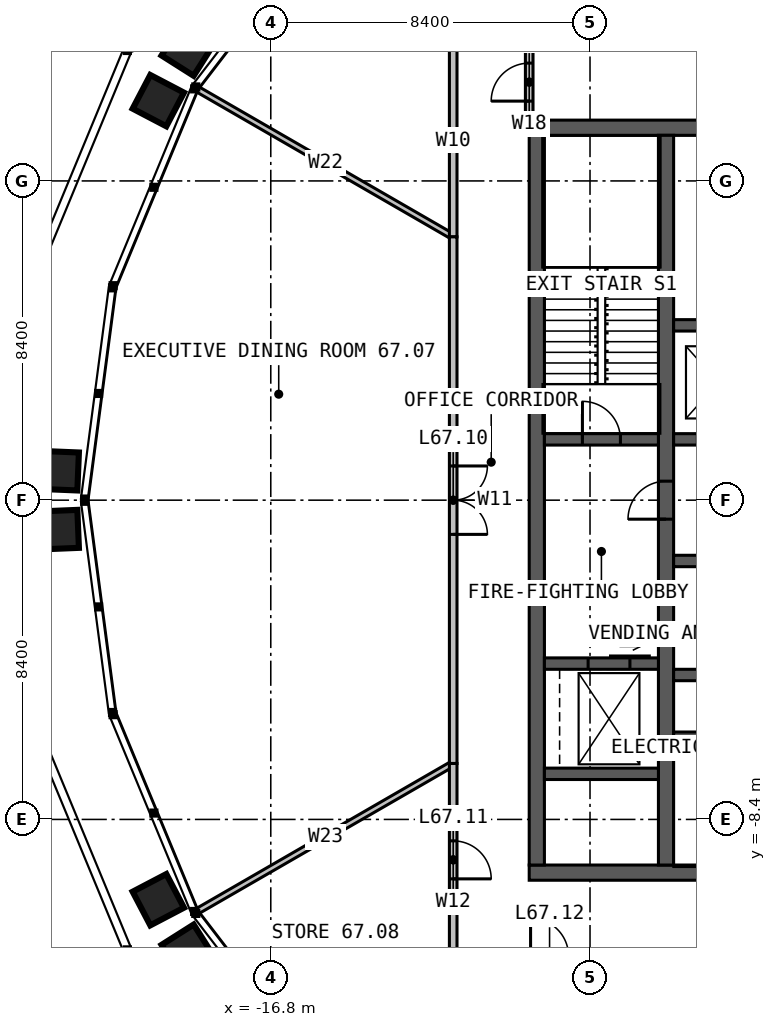
"""IFC4 building model, lengths in metres.
Left out: names, types, materials, properties, quantities, classifications, styles, units other than length and angle.
Written with IfcOpenShell. Run it as: python <this file> out.ifc"""

import sys

from ifc_helpers import new_model, si_unit, direction, frame, frame_2d, origin, place, context, subcontext, project, spatial, rectangle, extrude, element, fill, save


model = new_model("IFC4")
c1 = context("Model", 3, precision=1e-05, world=origin(), true_north=direction((0.0, 1.0)))
c2 = subcontext(c1, "Body", "Model", "MODEL_VIEW")
j1 = project(units=[si_unit("LENGTHUNIT", "METRE"), si_unit("PLANEANGLEUNIT", "RADIAN")], contexts=[c1])
p1 = place(None, origin())
s1 = spatial("IfcSite", under=j1, at=p1, CompositionType="ELEMENT")
p2 = place(p1, origin())
s2 = spatial("IfcBuilding", under=s1, at=p2, CompositionType="ELEMENT")
p3 = place(p2, frame((0.0, 0.0, 276.0)))
s3 = spatial("IfcBuildingStorey", under=s2, at=p3, CompositionType="ELEMENT", Elevation=276.0)
p4 = place(p3, frame((-10.0, 9.8, 0.0), z_axis=(0.0, 0.0, 1.0), x_axis=(1.0, 0.0, 0.0)))
e1 = element("IfcWall", 1, at=p4, inside=s3, PredefinedType="SOLIDWALL", context=c2, shape_type="SweptSolid", body=[
    extrude(rectangle(XDim=20.0, YDim=0.4, at=frame_2d((10.0, 0.0))), origin(), (0.0, 0.0, 1.0), 4.0),
])
p5 = place(p4, frame((9.4, 0.0, 0.0)))
e2 = element("IfcOpeningElement", 2, at=p5, cuts=e1, PredefinedType="OPENING", context=c2, shape_type="SweptSolid", body=[
    extrude(rectangle(XDim=1.2, YDim=2.2, at=frame_2d((0.6, 1.1))), frame((0.0, 0.21, 0.0), z_axis=(0.0, -1.0, 0.0), x_axis=(1.0, 0.0, 0.0)), (0.0, 0.0, 1.0), 0.42),
])
p6 = place(p3, frame((10.0, -9.8, 0.0), z_axis=(0.0, 0.0, 1.0), x_axis=(-1.0, 0.0, 0.0)))
e3 = element("IfcWall", 3, at=p6, inside=s3, PredefinedType="SOLIDWALL", context=c2, shape_type="SweptSolid", body=[
    extrude(rectangle(XDim=20.0, YDim=0.4, at=frame_2d((10.0, 0.0))), origin(), (0.0, 0.0, 1.0), 4.0),
])
p7 = place(p6, frame((6.875, 0.0, 0.0)))
e4 = element("IfcOpeningElement", 4, at=p7, cuts=e3, PredefinedType="OPENING", context=c2, shape_type="SweptSolid", body=[
    extrude(rectangle(XDim=1.2, YDim=2.2, at=frame_2d((0.6, 1.1))), frame((0.0, 0.21, 0.0), z_axis=(0.0, -1.0, 0.0), x_axis=(1.0, 0.0, 0.0)), (0.0, 0.0, 1.0), 0.42),
])
p8 = place(p3, frame((-9.8, 9.6, 0.0), z_axis=(0.0, 0.0, 1.0), x_axis=(0.0, -1.0, 0.0)))
e5 = element("IfcWall", 5, at=p8, inside=s3, PredefinedType="SOLIDWALL", context=c2, shape_type="SweptSolid", body=[
    extrude(rectangle(XDim=19.2, YDim=0.4, at=frame_2d((9.6, 0.0))), origin(), (0.0, 0.0, 1.0), 4.0),
])
p9 = place(p3, frame((-6.4, -9.6, 0.0), z_axis=(0.0, 0.0, 1.0), x_axis=(0.0, 1.0, 0.0)))
e6 = element("IfcWall", 6, at=p9, inside=s3, PredefinedType="SOLIDWALL", context=c2, shape_type="SweptSolid", body=[
    extrude(rectangle(XDim=19.2, YDim=0.4, at=frame_2d((9.6, 0.0))), origin(), (0.0, 0.0, 1.0), 4.0),
])
p10 = place(p9, frame((9.1, 0.0, 0.0)))
e7 = element("IfcOpeningElement", 7, at=p10, cuts=e6, PredefinedType="OPENING", context=c2, shape_type="SweptSolid", body=[
    extrude(rectangle(XDim=1.0, YDim=2.2, at=frame_2d((0.5, 1.1))), frame((0.0, 0.21, 0.0), z_axis=(0.0, -1.0, 0.0), x_axis=(1.0, 0.0, 0.0)), (0.0, 0.0, 1.0), 0.42),
])
p11 = place(p3, frame((-6.2, 1.6, 0.0), z_axis=(0.0, 0.0, 1.0), x_axis=(1.0, 0.0, 0.0)))
e8 = element("IfcWall", 8, at=p11, inside=s3, PredefinedType="SOLIDWALL", context=c2, shape_type="SweptSolid", body=[
    extrude(rectangle(XDim=4.85, YDim=0.3, at=frame_2d((2.425, 0.0))), origin(), (0.0, 0.0, 1.0), 4.0),
])
p12 = place(p11, frame((0.625, 0.0, 0.0)))
e9 = element("IfcOpeningElement", 9, at=p12, cuts=e8, PredefinedType="OPENING", context=c2, shape_type="SweptSolid", body=[
    extrude(rectangle(XDim=1.1, YDim=2.2, at=frame_2d((0.55, 1.1))), frame((0.0, 0.16, 0.0), z_axis=(0.0, -1.0, 0.0), x_axis=(1.0, 0.0, 0.0)), (0.0, 0.0, 1.0), 0.32),
])
p13 = place(p11, frame((3.15, 0.0, 0.0)))
e10 = element("IfcOpeningElement", 10, at=p13, cuts=e8, PredefinedType="OPENING", context=c2, shape_type="SweptSolid", body=[
    extrude(rectangle(XDim=1.1, YDim=2.2, at=frame_2d((0.55, 1.1))), frame((0.0, 0.16, 0.0), z_axis=(0.0, -1.0, 0.0), x_axis=(1.0, 0.0, 0.0)), (0.0, 0.0, 1.0), 0.32),
])
p14 = place(p3, frame((-6.2, 4.6, 0.0), z_axis=(0.0, 0.0, 1.0), x_axis=(1.0, 0.0, 0.0)))
e11 = element("IfcWall", 11, at=p14, inside=s3, PredefinedType="SOLIDWALL", context=c2, shape_type="SweptSolid", body=[
    extrude(rectangle(XDim=4.85, YDim=0.3, at=frame_2d((2.425, 0.0))), origin(), (0.0, 0.0, 1.0), 4.0),
])
p15 = place(p3, frame((-6.2, -1.6, 0.0), z_axis=(0.0, 0.0, 1.0), x_axis=(1.0, 0.0, 0.0)))
e12 = element("IfcWall", 12, at=p15, inside=s3, PredefinedType="SOLIDWALL", context=c2, shape_type="SweptSolid", body=[
    extrude(rectangle(XDim=7.4, YDim=0.3, at=frame_2d((3.7, 0.0))), origin(), (0.0, 0.0, 1.0), 4.0),
])
p16 = place(p15, frame((0.675, 0.0, 0.0)))
e13 = element("IfcOpeningElement", 13, at=p16, cuts=e12, PredefinedType="OPENING", context=c2, shape_type="SweptSolid", body=[
    extrude(rectangle(XDim=1.0, YDim=2.2, at=frame_2d((0.5, 1.1))), frame((0.0, 0.16, 0.0), z_axis=(0.0, -1.0, 0.0), x_axis=(1.0, 0.0, 0.0)), (0.0, 0.0, 1.0), 0.32),
])
p17 = place(p15, frame((2.225, 0.0, 0.0)))
e14 = element("IfcOpeningElement", 14, at=p17, cuts=e12, PredefinedType="OPENING", context=c2, shape_type="SweptSolid", body=[
    extrude(rectangle(XDim=1.0, YDim=2.2, at=frame_2d((0.5, 1.1))), frame((0.0, 0.16, 0.0), z_axis=(0.0, -1.0, 0.0), x_axis=(1.0, 0.0, 0.0)), (0.0, 0.0, 1.0), 0.32),
])
p18 = place(p15, frame((3.695, 0.0, 0.0)))
e15 = element("IfcOpeningElement", 15, at=p18, cuts=e12, PredefinedType="OPENING", context=c2, shape_type="SweptSolid", body=[
    extrude(rectangle(XDim=1.0, YDim=2.2, at=frame_2d((0.5, 1.1))), frame((0.0, 0.16, 0.0), z_axis=(0.0, -1.0, 0.0), x_axis=(1.0, 0.0, 0.0)), (0.0, 0.0, 1.0), 0.32),
])
p19 = place(p3, frame((-6.2, -4.6, 0.0), z_axis=(0.0, 0.0, 1.0), x_axis=(1.0, 0.0, 0.0)))
e16 = element("IfcWall", 16, at=p19, inside=s3, PredefinedType="SOLIDWALL", context=c2, shape_type="SweptSolid", body=[
    extrude(rectangle(XDim=7.4, YDim=0.3, at=frame_2d((3.7, 0.0))), origin(), (0.0, 0.0, 1.0), 4.0),
])
p20 = place(p3, frame((-6.2, -6.2, 0.0), z_axis=(0.0, 0.0, 1.0), x_axis=(1.0, 0.0, 0.0)))
e17 = element("IfcWall", 17, at=p20, inside=s3, PredefinedType="SOLIDWALL", context=c2, shape_type="SweptSolid", body=[
    extrude(rectangle(XDim=7.4, YDim=0.2, at=frame_2d((3.7, 0.0))), origin(), (0.0, 0.0, 1.0), 4.0),
])
p21 = place(p3, frame((-9.6, 1.6, 0.0), z_axis=(0.0, 0.0, 1.0), x_axis=(1.0, 0.0, 0.0)))
e18 = element("IfcWall", 18, at=p21, inside=s3, PredefinedType="SOLIDWALL", context=c2, shape_type="SweptSolid", body=[
    extrude(rectangle(XDim=3.0, YDim=0.3, at=frame_2d((1.5, 0.0))), origin(), (0.0, 0.0, 1.0), 4.0),
])
p22 = place(p21, frame((1.0, 0.0, 0.0)))
e19 = element("IfcOpeningElement", 19, at=p22, cuts=e18, PredefinedType="OPENING", context=c2, shape_type="SweptSolid", body=[
    extrude(rectangle(XDim=1.0, YDim=2.2, at=frame_2d((0.5, 1.1))), frame((0.0, 0.16, 0.0), z_axis=(0.0, -1.0, 0.0), x_axis=(1.0, 0.0, 0.0)), (0.0, 0.0, 1.0), 0.32),
])
p23 = place(p3, frame((-9.6, -4.3, 0.0), z_axis=(0.0, 0.0, 1.0), x_axis=(1.0, 0.0, 0.0)))
e20 = element("IfcWall", 20, at=p23, inside=s3, PredefinedType="SOLIDWALL", context=c2, shape_type="SweptSolid", body=[
    extrude(rectangle(XDim=3.0, YDim=0.3, at=frame_2d((1.5, 0.0))), origin(), (0.0, 0.0, 1.0), 4.0),
])
p24 = place(p23, frame((1.15, 0.0, 0.0)))
e21 = element("IfcOpeningElement", 21, at=p24, cuts=e20, PredefinedType="OPENING", context=c2, shape_type="SweptSolid", body=[
    extrude(rectangle(XDim=1.1, YDim=2.2, at=frame_2d((0.55, 1.1))), frame((0.0, 0.16, 0.0), z_axis=(0.0, -1.0, 0.0), x_axis=(1.0, 0.0, 0.0)), (0.0, 0.0, 1.0), 0.32),
])
p25 = place(p3, frame((-9.6, -7.2, 0.0), z_axis=(0.0, 0.0, 1.0), x_axis=(1.0, 0.0, 0.0)))
e22 = element("IfcWall", 22, at=p25, inside=s3, PredefinedType="SOLIDWALL", context=c2, shape_type="SweptSolid", body=[
    extrude(rectangle(XDim=3.0, YDim=0.3, at=frame_2d((1.5, 0.0))), origin(), (0.0, 0.0, 1.0), 4.0),
])
for number, where, z_axis, x_axis in (
    (23, (-12.0, 6.928, 0.0), (0.0, 0.0, 1.0), (-0.866, 0.5, 0.0)),
    (24, (-12.0, -6.928, 0.0), (0.0, 0.0, 1.0), (-0.866, -0.5, 0.0)),
):
    element("IfcWall", number, at=place(p3, frame(where, z_axis=z_axis, x_axis=x_axis)), inside=s3, PredefinedType="PARTITIONING", context=c2, shape_type="SweptSolid", body=[
        extrude(rectangle(XDim=7.752, YDim=0.15, at=frame_2d((3.876, 0.0))), origin(), (0.0, 0.0, 1.0), 2.79),
    ])
p26 = place(p3, frame((-12.0, 12.0, 0.0), z_axis=(0.0, 0.0, 1.0), x_axis=(0.0, -1.0, 0.0)))
e25 = element("IfcWall", 25, at=p26, inside=s3, PredefinedType="PARTITIONING", context=c2, shape_type="SweptSolid", body=[
    extrude(rectangle(XDim=5.072, YDim=0.2, at=frame_2d((2.536, 0.0))), origin(), (0.0, 0.0, 1.0), 3.8),
])
p27 = place(p3, frame((-12.0, 6.928, 0.0), z_axis=(0.0, 0.0, 1.0), x_axis=(0.0, -1.0, 0.0)))
e26 = element("IfcWall", 26, at=p27, inside=s3, PredefinedType="PARTITIONING", context=c2, shape_type="SweptSolid", body=[
    extrude(rectangle(XDim=13.856, YDim=0.2, at=frame_2d((6.928, 0.0))), origin(), (0.0, 0.0, 1.0), 3.8),
])
p28 = place(p27, frame((6.028, 0.0, 0.0)))
e27 = element("IfcOpeningElement", 27, at=p28, cuts=e26, PredefinedType="OPENING", context=c2, shape_type="SweptSolid", body=[
    extrude(rectangle(XDim=1.8, YDim=2.2, at=frame_2d((0.9, 1.1))), frame((0.0, 0.11, 0.0), z_axis=(0.0, -1.0, 0.0), x_axis=(1.0, 0.0, 0.0)), (0.0, 0.0, 1.0), 0.22),
])
p29 = place(p3, frame((-12.0, -6.928, 0.0), z_axis=(0.0, 0.0, 1.0), x_axis=(0.0, -1.0, 0.0)))
e28 = element("IfcWall", 28, at=p29, inside=s3, PredefinedType="PARTITIONING", context=c2, shape_type="SweptSolid", body=[
    extrude(rectangle(XDim=5.072, YDim=0.2, at=frame_2d((2.536, 0.0))), origin(), (0.0, 0.0, 1.0), 3.8),
])
p30 = place(p29, frame((2.036, 0.0, 0.0)))
e29 = element("IfcOpeningElement", 29, at=p30, cuts=e28, PredefinedType="OPENING", context=c2, shape_type="SweptSolid", body=[
    extrude(rectangle(XDim=1.0, YDim=2.2, at=frame_2d((0.5, 1.1))), frame((0.0, 0.11, 0.0), z_axis=(0.0, -1.0, 0.0), x_axis=(1.0, 0.0, 0.0)), (0.0, 0.0, 1.0), 0.22),
])
p31 = place(p3, frame((-10.0, 10.0, 0.0), z_axis=(0.0, 0.0, 1.0), x_axis=(0.0, 1.0, 0.0)))
e30 = element("IfcWall", 30, at=p31, inside=s3, PredefinedType="PARTITIONING", context=c2, shape_type="SweptSolid", body=[
    extrude(rectangle(XDim=2.0, YDim=0.2, at=frame_2d((1.0, 0.0))), origin(), (0.0, 0.0, 1.0), 3.8),
])
p32 = place(p31, frame((0.5, 0.0, 0.0)))
e31 = element("IfcOpeningElement", 31, at=p32, cuts=e30, PredefinedType="OPENING", context=c2, shape_type="SweptSolid", body=[
    extrude(rectangle(XDim=1.0, YDim=2.2, at=frame_2d((0.5, 1.1))), frame((0.0, 0.11, 0.0), z_axis=(0.0, -1.0, 0.0), x_axis=(1.0, 0.0, 0.0)), (0.0, 0.0, 1.0), 0.22),
])
p33 = place(p10, origin())
e32 = element("IfcDoor", 32, at=p33, inside=s3, OperationType="SINGLE_SWING_LEFT", PredefinedType="DOOR", context=c2, shape_type="SweptSolid", body=[
    extrude(rectangle(XDim=1.0, YDim=2.2, at=frame_2d((0.5, 1.1))), frame((0.0, 0.025, 0.0), z_axis=(0.0, -1.0, 0.0), x_axis=(1.0, 0.0, 0.0)), (0.0, 0.0, 1.0), 0.05),
])
fill(e7, e32)
p34 = place(p22, origin())
e33 = element("IfcDoor", 33, at=p34, inside=s3, OperationType="SINGLE_SWING_LEFT", PredefinedType="DOOR", context=c2, shape_type="SweptSolid", body=[
    extrude(rectangle(XDim=1.0, YDim=2.2, at=frame_2d((0.5, 1.1))), frame((0.0, 0.025, 0.0), z_axis=(0.0, -1.0, 0.0), x_axis=(1.0, 0.0, 0.0)), (0.0, 0.0, 1.0), 0.05),
])
fill(e19, e33)
p35 = place(p24, origin())
e34 = element("IfcDoor", 34, at=p35, inside=s3, OperationType="SLIDING_TO_LEFT", PredefinedType="DOOR", context=c2, shape_type="SweptSolid", body=[
    extrude(rectangle(XDim=1.1, YDim=2.2, at=frame_2d((0.55, 1.1))), frame((0.0, 0.025, 0.0), z_axis=(0.0, -1.0, 0.0), x_axis=(1.0, 0.0, 0.0)), (0.0, 0.0, 1.0), 0.05),
])
fill(e21, e34)
p36 = place(p28, origin())
e35 = element("IfcDoor", 35, at=p36, inside=s3, OperationType="DOUBLE_DOOR_SINGLE_SWING", PredefinedType="DOOR", context=c2, shape_type="SweptSolid", body=[
    extrude(rectangle(XDim=1.8, YDim=2.2, at=frame_2d((0.9, 1.1))), frame((0.0, 0.025, 0.0), z_axis=(0.0, -1.0, 0.0), x_axis=(1.0, 0.0, 0.0)), (0.0, 0.0, 1.0), 0.05),
])
fill(e27, e35)
p37 = place(p30, origin())
e36 = element("IfcDoor", 36, at=p37, inside=s3, OperationType="SINGLE_SWING_RIGHT", PredefinedType="DOOR", context=c2, shape_type="SweptSolid", body=[
    extrude(rectangle(XDim=1.0, YDim=2.2, at=frame_2d((0.5, 1.1))), frame((0.0, 0.025, 0.0), z_axis=(0.0, -1.0, 0.0), x_axis=(1.0, 0.0, 0.0)), (0.0, 0.0, 1.0), 0.05),
])
fill(e29, e36)
p38 = place(p32, origin())
e37 = element("IfcDoor", 37, at=p38, inside=s3, OperationType="SINGLE_SWING_LEFT", PredefinedType="DOOR", context=c2, shape_type="SweptSolid", body=[
    extrude(rectangle(XDim=1.0, YDim=2.2, at=frame_2d((0.5, 1.1))), frame((0.0, 0.025, 0.0), z_axis=(0.0, -1.0, 0.0), x_axis=(1.0, 0.0, 0.0)), (0.0, 0.0, 1.0), 0.05),
])
fill(e31, e37)
save(model, sys.argv[1])
